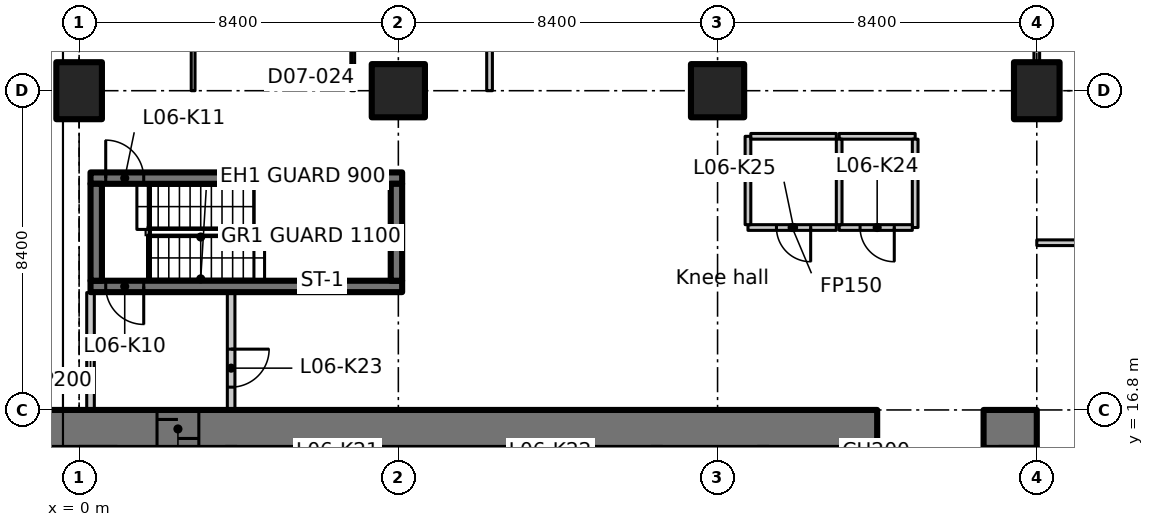
"""IFC4 building model, lengths in metres.
Left out: names, types, materials, properties, quantities, classifications, styles, units other than length and angle.
Written with IfcOpenShell. Run it as: python <this file> out.ifc"""

import sys

from ifc_helpers import new_model, si_unit, direction, frame, frame_2d, origin, origin_2d, place, context, subcontext, project, spatial, polyline, rectangle, outline, extrude, element, fill, save


model = new_model("IFC4")
c1 = context("Model", 3, precision=1e-05, world=origin(), true_north=direction((0.0, 1.0)))
c2 = subcontext(c1, "Body", "Model", "MODEL_VIEW")
j1 = project(units=[si_unit("LENGTHUNIT", "METRE"), si_unit("PLANEANGLEUNIT", "RADIAN")], contexts=[c1])
p1 = place(None, origin())
s1 = spatial("IfcSite", under=j1, at=p1, CompositionType="ELEMENT")
p2 = place(p1, origin())
s2 = spatial("IfcBuilding", under=s1, at=p2, CompositionType="ELEMENT")
p3 = place(p2, frame((0.0, 0.0, 36.5)))
s3 = spatial("IfcBuildingStorey", under=s2, at=p3, CompositionType="ELEMENT", Elevation=36.5)
p4 = place(p3, frame((0.0, 25.2, 0.0), z_axis=(0.0, 0.0, 1.0), x_axis=(1.0, 0.0, 0.0)))
e1 = element("IfcColumn", 1, at=p4, inside=s3, PredefinedType="COLUMN", context=c2, shape_type="SweptSolid", body=[
    extrude(rectangle(XDim=1.2, YDim=1.5, at=origin_2d()), origin(), (0.0, 0.0, 1.0), 3.35),
])
for number, where, z_axis, x_axis in (
    (2, (8.4, 25.2, 0.0), (0.0, 0.0, 1.0), (1.0, 0.0, 0.0)),
    (3, (16.8, 25.2, 0.0), (0.0, 0.0, 1.0), (1.0, 0.0, 0.0)),
):
    element("IfcColumn", number, at=place(p3, frame(where, z_axis=z_axis, x_axis=x_axis)), inside=s3, PredefinedType="COLUMN", context=c2, shape_type="SweptSolid", body=[
        extrude(rectangle(XDim=1.4, YDim=1.4, at=origin_2d()), origin(), (0.0, 0.0, 1.0), 3.35),
    ])
p5 = place(p3, frame((25.2, 25.2, 0.0), z_axis=(0.0, 0.0, 1.0), x_axis=(1.0, 0.0, 0.0)))
e4 = element("IfcColumn", 4, at=p5, inside=s3, PredefinedType="COLUMN", context=c2, shape_type="SweptSolid", body=[
    extrude(rectangle(XDim=1.2, YDim=1.5, at=origin_2d()), origin(), (0.0, 0.0, 1.0), 3.35),
])
p6 = place(p3, frame((-1.1, 16.3, 0.0), z_axis=(0.0, 0.0, 1.0), x_axis=(1.0, 0.0, 0.0)))
e5 = element("IfcWall", 5, at=p6, inside=s3, PredefinedType="SHEAR", context=c2, shape_type="SweptSolid", body=[
    extrude(rectangle(XDim=22.1, YDim=1.0, at=frame_2d((11.05, 0.0))), origin(), (0.0, 0.0, 1.0), 3.35),
])
p7 = place(p6, frame((3.15, 0.0, 0.0)))
e6 = element("IfcOpeningElement", 6, at=p7, cuts=e5, PredefinedType="OPENING", context=c2, shape_type="SweptSolid", body=[
    extrude(rectangle(XDim=1.1, YDim=2.3, at=frame_2d((0.55, 1.15))), frame((0.0, 0.51, 0.0), z_axis=(0.0, -1.0, 0.0), x_axis=(1.0, 0.0, 0.0)), (0.0, 0.0, 1.0), 1.02),
])
p8 = place(p3, frame((23.8, 16.3, 0.0), z_axis=(0.0, 0.0, 1.0), x_axis=(1.0, 0.0, 0.0)))
e7 = element("IfcWall", 7, at=p8, inside=s3, PredefinedType="SHEAR", context=c2, shape_type="SweptSolid", body=[
    extrude(rectangle(XDim=1.4, YDim=1.0, at=frame_2d((0.7, 0.0))), origin(), (0.0, 0.0, 1.0), 3.35),
])
p9 = place(p3, frame((24.7, 12.6, 0.0), z_axis=(0.0, 0.0, 1.0), x_axis=(0.0, 1.0, 0.0)))
e8 = element("IfcWall", 8, at=p9, inside=s3, PredefinedType="SHEAR", context=c2, shape_type="SweptSolid", body=[
    extrude(rectangle(XDim=3.2, YDim=1.0, at=frame_2d((1.6, 0.0))), origin(), (0.0, 0.0, 1.0), 3.35),
])
p10 = place(p3, frame((8.5, 20.05, 0.0), z_axis=(0.0, 0.0, 1.0), x_axis=(-1.0, 0.0, 0.0)))
e9 = element("IfcWall", 9, at=p10, inside=s3, PredefinedType="SHEAR", context=c2, shape_type="SweptSolid", body=[
    extrude(rectangle(XDim=8.2, YDim=0.3, at=frame_2d((4.1, 0.0))), origin(), (0.0, 0.0, 1.0), 3.35),
])
p11 = place(p10, frame((6.8, 0.0, 0.0)))
e10 = element("IfcOpeningElement", 10, at=p11, cuts=e9, PredefinedType="OPENING", context=c2, shape_type="SweptSolid", body=[
    extrude(rectangle(XDim=1.0, YDim=2.1, at=frame_2d((0.5, 1.05))), frame((0.0, 0.16, 0.0), z_axis=(0.0, -1.0, 0.0), x_axis=(1.0, 0.0, 0.0)), (0.0, 0.0, 1.0), 0.32),
])
p12 = place(p3, frame((0.3, 22.9, 0.0), z_axis=(0.0, 0.0, 1.0), x_axis=(1.0, 0.0, 0.0)))
e11 = element("IfcWall", 11, at=p12, inside=s3, PredefinedType="SHEAR", context=c2, shape_type="SweptSolid", body=[
    extrude(rectangle(XDim=8.2, YDim=0.3, at=frame_2d((4.1, 0.0))), origin(), (0.0, 0.0, 1.0), 3.35),
])
p13 = place(p12, frame((0.4, 0.0, 0.0)))
e12 = element("IfcOpeningElement", 12, at=p13, cuts=e11, PredefinedType="OPENING", context=c2, shape_type="SweptSolid", body=[
    extrude(rectangle(XDim=1.0, YDim=2.1, at=frame_2d((0.5, 1.05))), frame((0.0, 0.16, 0.0), z_axis=(0.0, -1.0, 0.0), x_axis=(1.0, 0.0, 0.0)), (0.0, 0.0, 1.0), 0.32),
])
for number, where, z_axis, x_axis in (
    (13, (0.45, 20.2, 0.0), (0.0, 0.0, 1.0), (0.0, 1.0, 0.0)),
    (14, (8.35, 20.2, 0.0), (0.0, 0.0, 1.0), (0.0, 1.0, 0.0)),
):
    element("IfcWall", number, at=place(p3, frame(where, z_axis=z_axis, x_axis=x_axis)), inside=s3, PredefinedType="SHEAR", context=c2, shape_type="SweptSolid", body=[
        extrude(rectangle(XDim=2.55, YDim=0.3, at=frame_2d((1.275, 0.0))), origin(), (0.0, 0.0, 1.0), 3.35),
    ])
p14 = place(p3, frame((0.3, 16.812, 0.0), z_axis=(0.0, 0.0, 1.0), x_axis=(0.0, 1.0, 0.0)))
e15 = element("IfcWall", 15, at=p14, inside=s3, PredefinedType="PARTITIONING", context=c2, shape_type="SweptSolid", body=[
    extrude(rectangle(XDim=3.076, YDim=0.2, at=frame_2d((1.538, 0.0))), origin(), (0.0, 0.0, 1.0), 2.98),
])
p15 = place(p3, frame((4.0, 19.888, 0.0), z_axis=(0.0, 0.0, 1.0), x_axis=(0.0, -1.0, 0.0)))
e16 = element("IfcWall", 16, at=p15, inside=s3, PredefinedType="PARTITIONING", context=c2, shape_type="SweptSolid", body=[
    extrude(rectangle(XDim=3.076, YDim=0.2, at=frame_2d((1.538, 0.0))), origin(), (0.0, 0.0, 1.0), 3.35),
])
p16 = place(p15, frame((1.488, 0.0, 0.0)))
e17 = element("IfcOpeningElement", 17, at=p16, cuts=e16, PredefinedType="OPENING", context=c2, shape_type="SweptSolid", body=[
    extrude(rectangle(XDim=1.0, YDim=2.1, at=frame_2d((0.5, 1.05))), frame((0.0, 0.11, 0.0), z_axis=(0.0, -1.0, 0.0), x_axis=(1.0, 0.0, 0.0)), (0.0, 0.0, 1.0), 0.22),
])
p17 = place(p3, frame((20.0, 24.0, 0.0), z_axis=(0.0, 0.0, 1.0), x_axis=(1.0, 0.0, 0.0)))
e18 = element("IfcWall", 18, at=p17, inside=s3, PredefinedType="PARTITIONING", context=c2, shape_type="SweptSolid", body=[
    extrude(rectangle(XDim=2.0, YDim=0.15, at=frame_2d((1.0, 0.0))), origin(), (0.0, 0.0, 1.0), 3.35),
])
p18 = place(p3, frame((22.0, 23.925, 0.0), z_axis=(0.0, 0.0, 1.0), x_axis=(0.0, -1.0, 0.0)))
e19 = element("IfcWall", 19, at=p18, inside=s3, PredefinedType="PARTITIONING", context=c2, shape_type="SweptSolid", body=[
    extrude(rectangle(XDim=2.325, YDim=0.15, at=frame_2d((1.163, 0.0))), origin(), (0.0, 0.0, 1.0), 3.35),
])
p19 = place(p3, frame((21.925, 21.6, 0.0), z_axis=(0.0, 0.0, 1.0), x_axis=(-1.0, 0.0, 0.0)))
e20 = element("IfcWall", 20, at=p19, inside=s3, PredefinedType="PARTITIONING", context=c2, shape_type="SweptSolid", body=[
    extrude(rectangle(XDim=1.925, YDim=0.15, at=frame_2d((0.962, 0.0))), origin(), (0.0, 0.0, 1.0), 3.35),
])
p20 = place(p19, frame((0.475, 0.0, 0.0)))
e21 = element("IfcOpeningElement", 21, at=p20, cuts=e20, PredefinedType="OPENING", context=c2, shape_type="SweptSolid", body=[
    extrude(rectangle(XDim=0.9, YDim=2.1, at=frame_2d((0.45, 1.05))), frame((0.0, 0.085, 0.0), z_axis=(0.0, -1.0, 0.0), x_axis=(1.0, 0.0, 0.0)), (0.0, 0.0, 1.0), 0.17),
])
p21 = place(p3, frame((20.0, 21.675, 0.0), z_axis=(0.0, 0.0, 1.0), x_axis=(0.0, 1.0, 0.0)))
e22 = element("IfcWall", 22, at=p21, inside=s3, PredefinedType="PARTITIONING", context=c2, shape_type="SweptSolid", body=[
    extrude(rectangle(XDim=2.25, YDim=0.15, at=frame_2d((1.125, 0.0))), origin(), (0.0, 0.0, 1.0), 3.35),
])
p22 = place(p3, frame((19.925, 21.6, 0.0), z_axis=(0.0, 0.0, 1.0), x_axis=(-1.0, 0.0, 0.0)))
e23 = element("IfcWall", 23, at=p22, inside=s3, PredefinedType="PARTITIONING", context=c2, shape_type="SweptSolid", body=[
    extrude(rectangle(XDim=2.325, YDim=0.15, at=frame_2d((1.163, 0.0))), origin(), (0.0, 0.0, 1.0), 3.35),
])
p23 = place(p22, frame((0.675, 0.0, 0.0)))
e24 = element("IfcOpeningElement", 24, at=p23, cuts=e23, PredefinedType="OPENING", context=c2, shape_type="SweptSolid", body=[
    extrude(rectangle(XDim=0.9, YDim=2.1, at=frame_2d((0.45, 1.05))), frame((0.0, 0.085, 0.0), z_axis=(0.0, -1.0, 0.0), x_axis=(1.0, 0.0, 0.0)), (0.0, 0.0, 1.0), 0.17),
])
p24 = place(p3, frame((17.6, 21.675, 0.0), z_axis=(0.0, 0.0, 1.0), x_axis=(0.0, 1.0, 0.0)))
e25 = element("IfcWall", 25, at=p24, inside=s3, PredefinedType="PARTITIONING", context=c2, shape_type="SweptSolid", body=[
    extrude(rectangle(XDim=2.325, YDim=0.15, at=frame_2d((1.163, 0.0))), origin(), (0.0, 0.0, 1.0), 3.35),
])
p25 = place(p3, frame((17.675, 24.0, 0.0), z_axis=(0.0, 0.0, 1.0), x_axis=(1.0, 0.0, 0.0)))
e26 = element("IfcWall", 26, at=p25, inside=s3, PredefinedType="PARTITIONING", context=c2, shape_type="SweptSolid", body=[
    extrude(rectangle(XDim=2.25, YDim=0.15, at=frame_2d((1.125, 0.0))), origin(), (0.0, 0.0, 1.0), 3.35),
])
p26 = place(p3, frame((25.2, 21.2, 0.0), z_axis=(0.0, 0.0, 1.0), x_axis=(1.0, 0.0, 0.0)))
e27 = element("IfcWall", 27, at=p26, inside=s3, PredefinedType="PARTITIONING", context=c2, shape_type="SweptSolid", body=[
    extrude(rectangle(XDim=4.2, YDim=0.15, at=frame_2d((2.1, 0.0))), origin(), (0.0, 0.0, 1.0), 3.33),
])
p27 = place(p3, frame((25.2, 31.0, 0.0), z_axis=(0.0, 0.0, 1.0), x_axis=(0.0, -1.0, 0.0)))
e28 = element("IfcWall", 28, at=p27, inside=s3, PredefinedType="PARTITIONING", context=c2, shape_type="SweptSolid", body=[
    extrude(outline(polyline([(0.0, 0.0), (5.03, 0.0), (5.03, 2.98), (0.0, 2.98), (0.0, 0.0)])), frame((0.0, 0.075, 0.0), z_axis=(0.0, -1.0, 0.0), x_axis=(1.0, 0.0, 0.0)), (0.0, 0.0, 1.0), 0.15),
])
p28 = place(p27, frame((1.83, 0.0, 0.0)))
e29 = element("IfcOpeningElement", 29, at=p28, cuts=e28, PredefinedType="OPENING", context=c2, shape_type="SweptSolid", body=[
    extrude(rectangle(XDim=1.1, YDim=2.1, at=frame_2d((0.55, 1.05))), frame((0.0, 0.085, 0.0), z_axis=(0.0, -1.0, 0.0), x_axis=(1.0, 0.0, 0.0)), (0.0, 0.0, 1.0), 0.17),
])
p29 = place(p3, frame((10.8, 25.2, 0.0), z_axis=(0.0, 0.0, 1.0), x_axis=(0.0, 1.0, 0.0)))
e30 = element("IfcWall", 30, at=p29, inside=s3, PredefinedType="PARTITIONING", context=c2, shape_type="SweptSolid", body=[
    extrude(rectangle(XDim=4.2, YDim=0.15, at=frame_2d((2.1, 0.0))), origin(), (0.0, 0.0, 1.0), 3.33),
])
p30 = place(p3, frame((3.0, 29.4, 0.0), z_axis=(0.0, 0.0, 1.0), x_axis=(0.0, -1.0, 0.0)))
e31 = element("IfcWall", 31, at=p30, inside=s3, PredefinedType="PARTITIONING", context=c2, shape_type="SweptSolid", body=[
    extrude(rectangle(XDim=4.2, YDim=0.1, at=frame_2d((2.1, 0.0))), origin(), (0.0, 0.0, 1.0), 3.33),
])
p31 = place(p3, frame((7.2, 29.4, 0.0), z_axis=(0.0, 0.0, 1.0), x_axis=(0.0, -1.0, 0.0)))
e32 = element("IfcWall", 32, at=p31, inside=s3, PredefinedType="PARTITIONING", context=c2, shape_type="SweptSolid", body=[
    extrude(rectangle(XDim=4.2, YDim=0.1, at=frame_2d((2.1, 0.0))), origin(), (0.0, 0.0, 1.0), 3.33),
])
p32 = place(p31, frame((1.5, 0.0, 0.0)))
e33 = element("IfcOpeningElement", 33, at=p32, cuts=e32, PredefinedType="OPENING", context=c2, shape_type="SweptSolid", body=[
    extrude(rectangle(XDim=0.9, YDim=2.1, at=frame_2d((0.45, 1.05))), frame((0.0, 0.06, 0.0), z_axis=(0.0, -1.0, 0.0), x_axis=(1.0, 0.0, 0.0)), (0.0, 0.0, 1.0), 0.12),
])
p33 = place(p7, origin())
e34 = element("IfcDoor", 34, at=p33, inside=s3, OperationType="SLIDING_TO_LEFT", PredefinedType="DOOR", context=c2, shape_type="SweptSolid", body=[
    extrude(rectangle(XDim=1.1, YDim=2.3, at=frame_2d((0.55, 1.15))), frame((0.0, 0.025, 0.0), z_axis=(0.0, -1.0, 0.0), x_axis=(1.0, 0.0, 0.0)), (0.0, 0.0, 1.0), 0.05),
])
fill(e6, e34)
p34 = place(p11, origin())
e35 = element("IfcDoor", 35, at=p34, inside=s3, OperationType="SINGLE_SWING_RIGHT", PredefinedType="DOOR", context=c2, shape_type="SweptSolid", body=[
    extrude(rectangle(XDim=1.0, YDim=2.1, at=frame_2d((0.5, 1.05))), frame((0.0, 0.025, 0.0), z_axis=(0.0, -1.0, 0.0), x_axis=(1.0, 0.0, 0.0)), (0.0, 0.0, 1.0), 0.05),
])
fill(e10, e35)
p35 = place(p13, origin())
e36 = element("IfcDoor", 36, at=p35, inside=s3, OperationType="SINGLE_SWING_LEFT", PredefinedType="DOOR", context=c2, shape_type="SweptSolid", body=[
    extrude(rectangle(XDim=1.0, YDim=2.1, at=frame_2d((0.5, 1.05))), frame((0.0, 0.025, 0.0), z_axis=(0.0, -1.0, 0.0), x_axis=(1.0, 0.0, 0.0)), (0.0, 0.0, 1.0), 0.05),
])
fill(e12, e36)
p36 = place(p16, origin())
e37 = element("IfcDoor", 37, at=p36, inside=s3, OperationType="SINGLE_SWING_LEFT", PredefinedType="DOOR", context=c2, shape_type="SweptSolid", body=[
    extrude(rectangle(XDim=1.0, YDim=2.1, at=frame_2d((0.5, 1.05))), frame((0.0, 0.025, 0.0), z_axis=(0.0, -1.0, 0.0), x_axis=(1.0, 0.0, 0.0)), (0.0, 0.0, 1.0), 0.05),
])
fill(e17, e37)
p37 = place(p20, origin())
e38 = element("IfcDoor", 38, at=p37, inside=s3, OperationType="SINGLE_SWING_RIGHT", PredefinedType="DOOR", context=c2, shape_type="SweptSolid", body=[
    extrude(rectangle(XDim=0.9, YDim=2.1, at=frame_2d((0.45, 1.05))), frame((0.0, 0.025, 0.0), z_axis=(0.0, -1.0, 0.0), x_axis=(1.0, 0.0, 0.0)), (0.0, 0.0, 1.0), 0.05),
])
fill(e21, e38)
p38 = place(p23, origin())
e39 = element("IfcDoor", 39, at=p38, inside=s3, OperationType="SINGLE_SWING_LEFT", PredefinedType="DOOR", context=c2, shape_type="SweptSolid", body=[
    extrude(rectangle(XDim=0.9, YDim=2.1, at=frame_2d((0.45, 1.05))), frame((0.0, 0.025, 0.0), z_axis=(0.0, -1.0, 0.0), x_axis=(1.0, 0.0, 0.0)), (0.0, 0.0, 1.0), 0.05),
])
fill(e24, e39)
save(model, sys.argv[1])
